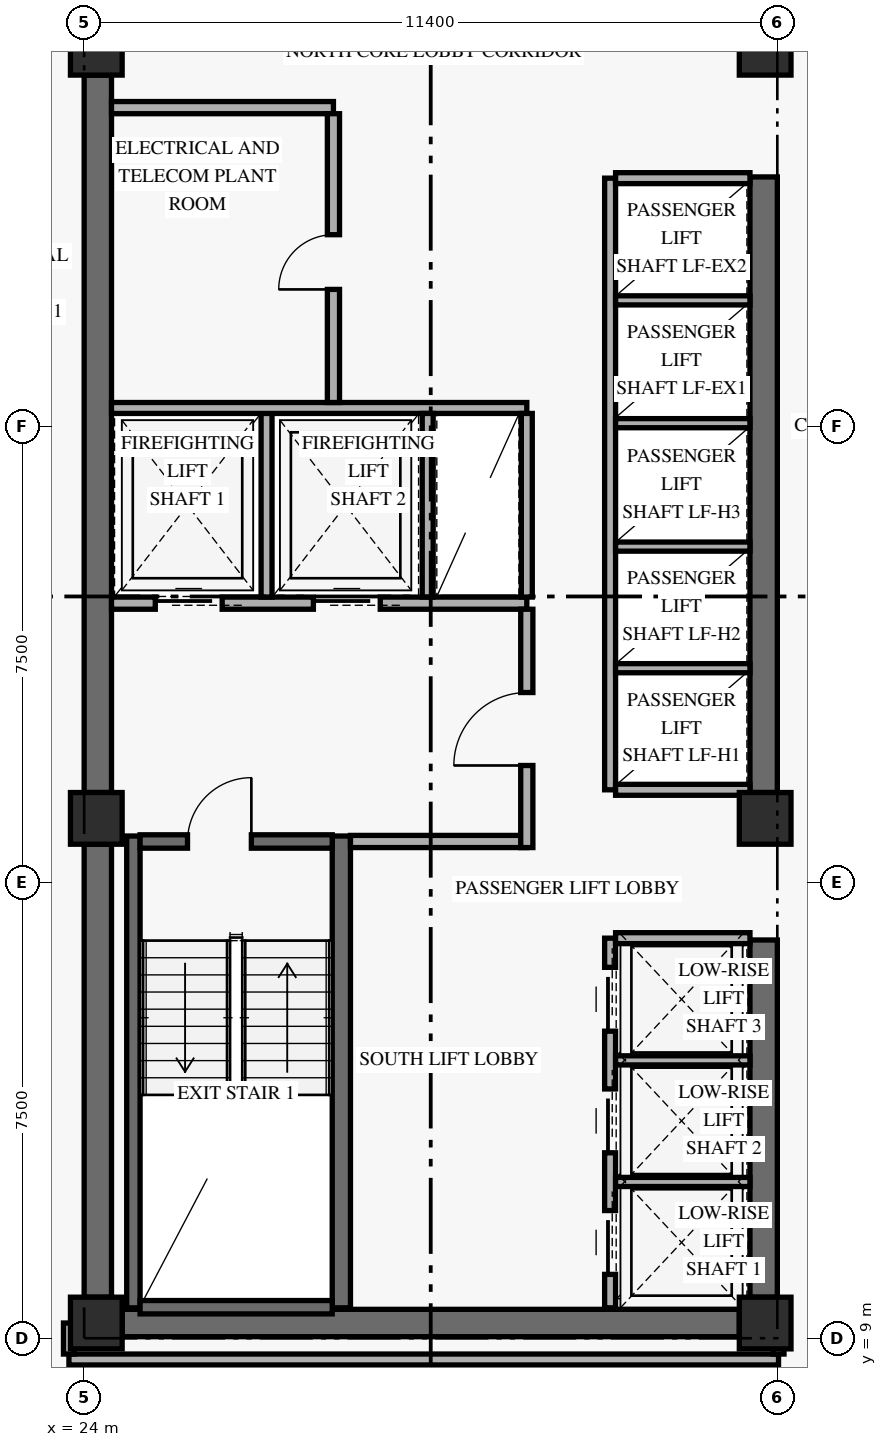
"""IFC4 building model, lengths in metres.
Left out: names, types, materials, properties, quantities, classifications, styles, units other than length and angle.
Written with IfcOpenShell. Run it as: python <this file> out.ifc"""

import sys

from ifc_helpers import new_model, si_unit, direction, frame, frame_2d, origin, origin_2d, place, context, subcontext, project, spatial, rectangle, extrude, element, fill, save


model = new_model("IFC4")
c1 = context("Model", 3, precision=1e-05, world=origin(), true_north=direction((0.0, 1.0)))
c2 = subcontext(c1, "Body", "Model", "MODEL_VIEW")
j1 = project(units=[si_unit("LENGTHUNIT", "METRE"), si_unit("PLANEANGLEUNIT", "RADIAN")], contexts=[c1])
p1 = place(None, origin())
s1 = spatial("IfcSite", under=j1, at=p1, CompositionType="ELEMENT")
p2 = place(p1, origin())
s2 = spatial("IfcBuilding", under=s1, at=p2, CompositionType="ELEMENT")
p3 = place(p2, frame((0.0, 0.0, 94.8)))
s3 = spatial("IfcBuildingStorey", under=s2, at=p3, CompositionType="ELEMENT", Elevation=94.8)
p4 = place(p3, frame((24.225, 9.675, 0.0), z_axis=(0.0, 0.0, 1.0), x_axis=(0.0, 1.0, 0.0)))
e1 = element("IfcWall", 1, at=p4, inside=s3, PredefinedType="SHEAR", context=c2, shape_type="SweptSolid", body=[
    extrude(rectangle(XDim=7.45, YDim=0.45, at=frame_2d((3.725, 0.0))), origin(), (0.0, 0.0, 1.0), 2.739),
])
p5 = place(p3, frame((24.225, 17.975, 0.0), z_axis=(0.0, 0.0, 1.0), x_axis=(0.0, 1.0, 0.0)))
e2 = element("IfcWall", 2, at=p5, inside=s3, PredefinedType="SHEAR", context=c2, shape_type="SweptSolid", body=[
    extrude(rectangle(XDim=11.8, YDim=0.45, at=frame_2d((5.9, 0.0))), origin(), (0.0, 0.0, 1.0), 2.739),
])
p6 = place(p3, frame((35.175, 9.675, 0.0), z_axis=(0.0, 0.0, 1.0), x_axis=(0.0, 1.0, 0.0)))
e3 = element("IfcWall", 3, at=p6, inside=s3, PredefinedType="SHEAR", context=c2, shape_type="SweptSolid", body=[
    extrude(rectangle(XDim=5.875, YDim=0.45, at=frame_2d((2.938, 0.0))), origin(), (0.0, 0.0, 1.0), 2.739),
])
p7 = place(p3, frame((35.175, 17.975, 0.0), z_axis=(0.0, 0.0, 1.0), x_axis=(0.0, 1.0, 0.0)))
e4 = element("IfcWall", 4, at=p7, inside=s3, PredefinedType="SHEAR", context=c2, shape_type="SweptSolid", body=[
    extrude(rectangle(XDim=10.125, YDim=0.45, at=frame_2d((5.062, 0.0))), origin(), (0.0, 0.0, 1.0), 2.739),
])
p8 = place(p3, frame((24.625, 9.25, 0.0), z_axis=(0.0, 0.0, 1.0), x_axis=(1.0, 0.0, 0.0)))
e5 = element("IfcWall", 5, at=p8, inside=s3, PredefinedType="SHEAR", context=c2, shape_type="SweptSolid", body=[
    extrude(rectangle(XDim=10.15, YDim=0.45, at=frame_2d((5.075, 0.0))), origin(), (0.0, 0.0, 1.0), 3.35),
])
p9 = place(p3, frame((24.81, 9.5, 0.0), z_axis=(0.0, 0.0, 1.0), x_axis=(0.0, 1.0, 0.0)))
e6 = element("IfcWall", 6, at=p9, inside=s3, PredefinedType="SHEAR", context=c2, shape_type="SweptSolid", body=[
    extrude(rectangle(XDim=7.76, YDim=0.22, at=frame_2d((3.88, 0.0))), origin(), (0.0, 0.0, 1.0), 3.35),
])
p10 = place(p3, frame((28.23, 9.5, 0.0), z_axis=(0.0, 0.0, 1.0), x_axis=(0.0, 1.0, 0.0)))
e7 = element("IfcWall", 7, at=p10, inside=s3, PredefinedType="SHEAR", context=c2, shape_type="SweptSolid", body=[
    extrude(rectangle(XDim=7.76, YDim=0.3, at=frame_2d((3.88, 0.0))), origin(), (0.0, 0.0, 1.0), 3.35),
])
p11 = place(p3, frame((24.92, 9.51, 0.0), z_axis=(0.0, 0.0, 1.0), x_axis=(1.0, 0.0, 0.0)))
e8 = element("IfcWall", 8, at=p11, inside=s3, PredefinedType="SHEAR", context=c2, shape_type="SweptSolid", body=[
    extrude(rectangle(XDim=3.16, YDim=0.22, at=frame_2d((1.58, 0.0))), origin(), (0.0, 0.0, 1.0), 3.35),
])
p12 = place(p3, frame((24.92, 17.17, 0.0), z_axis=(0.0, 0.0, 1.0), x_axis=(1.0, 0.0, 0.0)))
e9 = element("IfcWall", 9, at=p12, inside=s3, PredefinedType="SHEAR", context=c2, shape_type="SweptSolid", body=[
    extrude(rectangle(XDim=3.16, YDim=0.22, at=frame_2d((1.58, 0.0))), origin(), (0.0, 0.0, 1.0), 3.35),
])
p13 = place(p12, frame((0.78, 0.0, 0.0)))
e10 = element("IfcOpeningElement", 10, at=p13, cuts=e9, PredefinedType="OPENING", context=c2, shape_type="SweptSolid", body=[
    extrude(rectangle(XDim=1.05, YDim=2.15, at=frame_2d((0.525, 1.075))), frame((0.0, 0.12, 0.0), z_axis=(0.0, -1.0, 0.0), x_axis=(1.0, 0.0, 0.0)), (0.0, 0.0, 1.0), 0.24),
])
for number, where, z_axis, x_axis in (
    (11, (24.2, 9.25, 0.0), (0.0, 0.0, 1.0), (1.0, 0.0, 0.0)),
    (12, (24.2, 17.55, 0.0), (0.0, 0.0, 1.0), (1.0, 0.0, 0.0)),
    (13, (24.2, 30.2, 0.0), (0.0, 0.0, 1.0), (1.0, 0.0, 0.0)),
    (14, (35.2, 9.25, 0.0), (0.0, 0.0, 1.0), (1.0, 0.0, 0.0)),
    (15, (35.2, 17.55, 0.0), (0.0, 0.0, 1.0), (1.0, 0.0, 0.0)),
    (16, (35.2, 30.2, 0.0), (0.0, 0.0, 1.0), (1.0, 0.0, 0.0)),
):
    element("IfcColumn", number, at=place(p3, frame(where, z_axis=z_axis, x_axis=x_axis)), inside=s3, PredefinedType="COLUMN", context=c2, shape_type="SweptSolid", body=[
        extrude(rectangle(XDim=0.85, YDim=0.85, at=origin_2d()), origin(), (0.0, 0.0, 1.0), 3.6),
    ])
p14 = place(p3, frame((24.45, 21.09, 0.0), z_axis=(0.0, 0.0, 1.0), x_axis=(1.0, 0.0, 0.0)))
e17 = element("IfcWall", 17, at=p14, inside=s3, PredefinedType="STANDARD", context=c2, shape_type="SweptSolid", body=[
    extrude(rectangle(XDim=6.83, YDim=0.2, at=frame_2d((3.415, 0.0))), origin(), (0.0, 0.0, 1.0), 3.35),
])
p15 = place(p14, frame((0.72, 0.0, 0.0)))
e18 = element("IfcOpeningElement", 18, at=p15, cuts=e17, PredefinedType="OPENING", context=c2, shape_type="SweptSolid", body=[
    extrude(rectangle(XDim=1.1, YDim=2.2, at=frame_2d((0.55, 1.1))), frame((0.0, 0.11, 0.0), z_axis=(0.0, -1.0, 0.0), x_axis=(1.0, 0.0, 0.0)), (0.0, 0.0, 1.0), 0.22),
])
p16 = place(p14, frame((3.32, 0.0, 0.0)))
e19 = element("IfcOpeningElement", 19, at=p16, cuts=e17, PredefinedType="OPENING", context=c2, shape_type="SweptSolid", body=[
    extrude(rectangle(XDim=1.1, YDim=2.2, at=frame_2d((0.55, 1.1))), frame((0.0, 0.11, 0.0), z_axis=(0.0, -1.0, 0.0), x_axis=(1.0, 0.0, 0.0)), (0.0, 0.0, 1.0), 0.22),
])
p17 = place(p3, frame((28.38, 17.17, 0.0), z_axis=(0.0, 0.0, 1.0), x_axis=(1.0, 0.0, 0.0)))
e20 = element("IfcWall", 20, at=p17, inside=s3, PredefinedType="STANDARD", context=c2, shape_type="SweptSolid", body=[
    extrude(rectangle(XDim=2.9, YDim=0.2, at=frame_2d((1.45, 0.0))), origin(), (0.0, 0.0, 1.0), 3.35),
])
p18 = place(p3, frame((31.28, 17.07, 0.0), z_axis=(0.0, 0.0, 1.0), x_axis=(0.0, 1.0, 0.0)))
e21 = element("IfcWall", 21, at=p18, inside=s3, PredefinedType="STANDARD", context=c2, shape_type="SweptSolid", body=[
    extrude(rectangle(XDim=3.92, YDim=0.2, at=frame_2d((1.96, 0.0))), origin(), (0.0, 0.0, 1.0), 2.721),
])
p19 = place(p18, frame((1.35, 0.0, 0.0)))
e22 = element("IfcOpeningElement", 22, at=p19, cuts=e21, PredefinedType="OPENING", context=c2, shape_type="SweptSolid", body=[
    extrude(rectangle(XDim=1.2, YDim=2.15, at=frame_2d((0.6, 1.075))), frame((0.0, 0.11, 0.0), z_axis=(0.0, -1.0, 0.0), x_axis=(1.0, 0.0, 0.0)), (0.0, 0.0, 1.0), 0.22),
])
p20 = place(p3, frame((27.0, 21.19, 0.0), z_axis=(0.0, 0.0, 1.0), x_axis=(0.0, 1.0, 0.0)))
e23 = element("IfcWall", 23, at=p20, inside=s3, PredefinedType="STANDARD", context=c2, shape_type="SweptSolid", body=[
    extrude(rectangle(XDim=3.11, YDim=0.18, at=frame_2d((1.555, 0.0))), origin(), (0.0, 0.0, 1.0), 3.35),
])
p21 = place(p3, frame((24.45, 24.3, 0.0), z_axis=(0.0, 0.0, 1.0), x_axis=(1.0, 0.0, 0.0)))
e24 = element("IfcWall", 24, at=p21, inside=s3, PredefinedType="STANDARD", context=c2, shape_type="SweptSolid", body=[
    extrude(rectangle(XDim=6.83, YDim=0.18, at=frame_2d((3.415, 0.0))), origin(), (0.0, 0.0, 1.0), 3.35),
])
for number, where, z_axis, x_axis in (
    (25, (29.65, 21.19, 0.0), (0.0, 0.0, 1.0), (0.0, 1.0, 0.0)),
    (26, (31.28, 21.19, 0.0), (0.0, 0.0, 1.0), (0.0, 1.0, 0.0)),
):
    element("IfcWall", number, at=place(p3, frame(where, z_axis=z_axis, x_axis=x_axis)), inside=s3, PredefinedType="STANDARD", context=c2, shape_type="SweptSolid", body=[
        extrude(rectangle(XDim=3.02, YDim=0.18, at=frame_2d((1.51, 0.0))), origin(), (0.0, 0.0, 1.0), 3.35),
    ])
p22 = place(p3, frame((24.45, 29.24, 0.0), z_axis=(0.0, 0.0, 1.0), x_axis=(1.0, 0.0, 0.0)))
e27 = element("IfcWall", 27, at=p22, inside=s3, PredefinedType="STANDARD", context=c2, shape_type="SweptSolid", body=[
    extrude(rectangle(XDim=3.65, YDim=0.2, at=frame_2d((1.825, 0.0))), origin(), (0.0, 0.0, 1.0), 3.35),
])
p23 = place(p3, frame((28.1, 24.39, 0.0), z_axis=(0.0, 0.0, 1.0), x_axis=(0.0, 1.0, 0.0)))
e28 = element("IfcWall", 28, at=p23, inside=s3, PredefinedType="STANDARD", context=c2, shape_type="SweptSolid", body=[
    extrude(rectangle(XDim=4.75, YDim=0.2, at=frame_2d((2.375, 0.0))), origin(), (0.0, 0.0, 1.0), 3.35),
])
p24 = place(p23, frame((1.86, 0.0, 0.0)))
e29 = element("IfcOpeningElement", 29, at=p24, cuts=e28, PredefinedType="OPENING", context=c2, shape_type="SweptSolid", body=[
    extrude(rectangle(XDim=0.9, YDim=2.1, at=frame_2d((0.45, 1.05))), frame((0.0, 0.11, 0.0), z_axis=(0.0, -1.0, 0.0), x_axis=(1.0, 0.0, 0.0)), (0.0, 0.0, 1.0), 0.22),
])
p25 = place(p3, frame((32.65, 9.5, 0.0), z_axis=(0.0, 0.0, 1.0), x_axis=(0.0, 1.0, 0.0)))
e30 = element("IfcWall", 30, at=p25, inside=s3, PredefinedType="STANDARD", context=c2, shape_type="SweptSolid", body=[
    extrude(rectangle(XDim=6.08, YDim=0.18, at=frame_2d((3.04, 0.0))), origin(), (0.0, 0.0, 1.0), 3.35),
])
p26 = place(p25, frame((0.55, 0.0, 0.0)))
e31 = element("IfcOpeningElement", 31, at=p26, cuts=e30, PredefinedType="OPENING", context=c2, shape_type="SweptSolid", body=[
    extrude(rectangle(XDim=1.05, YDim=2.2, at=frame_2d((0.525, 1.1))), frame((0.0, 0.1, 0.0), z_axis=(0.0, -1.0, 0.0), x_axis=(1.0, 0.0, 0.0)), (0.0, 0.0, 1.0), 0.2),
])
p27 = place(p25, frame((2.55, 0.0, 0.0)))
e32 = element("IfcOpeningElement", 32, at=p27, cuts=e30, PredefinedType="OPENING", context=c2, shape_type="SweptSolid", body=[
    extrude(rectangle(XDim=1.05, YDim=2.2, at=frame_2d((0.525, 1.1))), frame((0.0, 0.1, 0.0), z_axis=(0.0, -1.0, 0.0), x_axis=(1.0, 0.0, 0.0)), (0.0, 0.0, 1.0), 0.2),
])
p28 = place(p25, frame((4.55, 0.0, 0.0)))
e33 = element("IfcOpeningElement", 33, at=p28, cuts=e30, PredefinedType="OPENING", context=c2, shape_type="SweptSolid", body=[
    extrude(rectangle(XDim=1.05, YDim=2.2, at=frame_2d((0.525, 1.1))), frame((0.0, 0.1, 0.0), z_axis=(0.0, -1.0, 0.0), x_axis=(1.0, 0.0, 0.0)), (0.0, 0.0, 1.0), 0.2),
])
p29 = place(p3, frame((32.74, 15.58, 0.0), z_axis=(0.0, 0.0, 1.0), x_axis=(1.0, 0.0, 0.0)))
e34 = element("IfcWall", 34, at=p29, inside=s3, PredefinedType="STANDARD", context=c2, shape_type="SweptSolid", body=[
    extrude(rectangle(XDim=2.21, YDim=0.18, at=frame_2d((1.105, 0.0))), origin(), (0.0, 0.0, 1.0), 3.35),
])
for number, where, z_axis, x_axis in (
    (35, (32.74, 11.57, 0.0), (0.0, 0.0, 1.0), (1.0, 0.0, 0.0)),
    (36, (32.74, 13.57, 0.0), (0.0, 0.0, 1.0), (1.0, 0.0, 0.0)),
):
    element("IfcWall", number, at=place(p3, frame(where, z_axis=z_axis, x_axis=x_axis)), inside=s3, PredefinedType="STANDARD", context=c2, shape_type="SweptSolid", body=[
        extrude(rectangle(XDim=2.21, YDim=0.15, at=frame_2d((1.105, 0.0))), origin(), (0.0, 0.0, 1.0), 3.35),
    ])
p30 = place(p3, frame((32.65, 18.02, 0.0), z_axis=(0.0, 0.0, 1.0), x_axis=(0.0, 1.0, 0.0)))
e37 = element("IfcWall", 37, at=p30, inside=s3, PredefinedType="STANDARD", context=c2, shape_type="SweptSolid", body=[
    extrude(rectangle(XDim=10.06, YDim=0.18, at=frame_2d((5.03, 0.0))), origin(), (0.0, 0.0, 1.0), 3.35),
])
for number, where, z_axis, x_axis in (
    (38, (32.74, 18.02, 0.0), (0.0, 0.0, 1.0), (1.0, 0.0, 0.0)),
    (39, (32.74, 28.08, 0.0), (0.0, 0.0, 1.0), (1.0, 0.0, 0.0)),
):
    element("IfcWall", number, at=place(p3, frame(where, z_axis=z_axis, x_axis=x_axis)), inside=s3, PredefinedType="STANDARD", context=c2, shape_type="SweptSolid", body=[
        extrude(rectangle(XDim=2.21, YDim=0.18, at=frame_2d((1.105, 0.0))), origin(), (0.0, 0.0, 1.0), 3.35),
    ])
for number, where, z_axis, x_axis in (
    (40, (32.74, 20.02, 0.0), (0.0, 0.0, 1.0), (1.0, 0.0, 0.0)),
    (41, (32.74, 22.02, 0.0), (0.0, 0.0, 1.0), (1.0, 0.0, 0.0)),
    (42, (32.74, 24.05, 0.0), (0.0, 0.0, 1.0), (1.0, 0.0, 0.0)),
    (43, (32.74, 26.07, 0.0), (0.0, 0.0, 1.0), (1.0, 0.0, 0.0)),
):
    element("IfcWall", number, at=place(p3, frame(where, z_axis=z_axis, x_axis=x_axis)), inside=s3, PredefinedType="STANDARD", context=c2, shape_type="SweptSolid", body=[
        extrude(rectangle(XDim=2.21, YDim=0.15, at=frame_2d((1.105, 0.0))), origin(), (0.0, 0.0, 1.0), 3.35),
    ])
p31 = place(p3, frame((23.75, 8.65, 0.0), z_axis=(0.0, 0.0, 1.0), x_axis=(1.0, 0.0, 0.0)))
e44 = element("IfcWall", 44, at=p31, inside=s3, PredefinedType="STANDARD", context=c2, shape_type="SweptSolid", body=[
    extrude(rectangle(XDim=11.67, YDim=0.18, at=frame_2d((5.835, 0.0))), origin(), (0.0, 0.0, 1.0), 2.721),
])
for number, where, z_axis, x_axis in (
    (45, (35.42, 8.74, 0.0), (0.0, 0.0, 1.0), (0.0, 1.0, 0.0)),
    (46, (23.75, 8.74, 0.0), (0.0, 0.0, 1.0), (0.0, 1.0, 0.0)),
):
    element("IfcWall", number, at=place(p3, frame(where, z_axis=z_axis, x_axis=x_axis)), inside=s3, PredefinedType="STANDARD", context=c2, shape_type="SweptSolid", body=[
        extrude(rectangle(XDim=0.51, YDim=0.18, at=frame_2d((0.255, 0.0))), origin(), (0.0, 0.0, 1.0), 2.721),
    ])
p32 = place(p13, frame((1.05, 0.0, 0.0), z_axis=(0.0, 0.0, 1.0), x_axis=(-1.0, 0.0, 0.0)))
e47 = element("IfcDoor", 47, at=p32, inside=s3, OperationType="SINGLE_SWING_LEFT", PredefinedType="DOOR", context=c2, shape_type="SweptSolid", body=[
    extrude(rectangle(XDim=1.05, YDim=2.15, at=frame_2d((0.525, 1.075))), frame((0.0, 0.025, 0.0), z_axis=(0.0, -1.0, 0.0), x_axis=(1.0, 0.0, 0.0)), (0.0, 0.0, 1.0), 0.05),
])
fill(e10, e47)
p33 = place(p15, origin())
e48 = element("IfcDoor", 48, at=p33, inside=s3, OperationType="SLIDING_TO_LEFT", PredefinedType="DOOR", context=c2, shape_type="SweptSolid", body=[
    extrude(rectangle(XDim=1.1, YDim=2.2, at=frame_2d((0.55, 1.1))), frame((0.0, 0.025, 0.0), z_axis=(0.0, -1.0, 0.0), x_axis=(1.0, 0.0, 0.0)), (0.0, 0.0, 1.0), 0.05),
])
fill(e18, e48)
p34 = place(p16, origin())
e49 = element("IfcDoor", 49, at=p34, inside=s3, OperationType="SLIDING_TO_LEFT", PredefinedType="DOOR", context=c2, shape_type="SweptSolid", body=[
    extrude(rectangle(XDim=1.1, YDim=2.2, at=frame_2d((0.55, 1.1))), frame((0.0, 0.025, 0.0), z_axis=(0.0, -1.0, 0.0), x_axis=(1.0, 0.0, 0.0)), (0.0, 0.0, 1.0), 0.05),
])
fill(e19, e49)
p35 = place(p19, origin())
e50 = element("IfcDoor", 50, at=p35, inside=s3, OperationType="SINGLE_SWING_LEFT", PredefinedType="DOOR", context=c2, shape_type="SweptSolid", body=[
    extrude(rectangle(XDim=1.2, YDim=2.15, at=frame_2d((0.6, 1.075))), frame((0.0, 0.025, 0.0), z_axis=(0.0, -1.0, 0.0), x_axis=(1.0, 0.0, 0.0)), (0.0, 0.0, 1.0), 0.05),
])
fill(e22, e50)
p36 = place(p24, origin())
e51 = element("IfcDoor", 51, at=p36, inside=s3, OperationType="SINGLE_SWING_LEFT", PredefinedType="DOOR", context=c2, shape_type="SweptSolid", body=[
    extrude(rectangle(XDim=0.9, YDim=2.1, at=frame_2d((0.45, 1.05))), frame((0.0, 0.025, 0.0), z_axis=(0.0, -1.0, 0.0), x_axis=(1.0, 0.0, 0.0)), (0.0, 0.0, 1.0), 0.05),
])
fill(e29, e51)
p37 = place(p26, origin())
e52 = element("IfcDoor", 52, at=p37, inside=s3, OperationType="SLIDING_TO_LEFT", PredefinedType="DOOR", context=c2, shape_type="SweptSolid", body=[
    extrude(rectangle(XDim=1.05, YDim=2.2, at=frame_2d((0.525, 1.1))), frame((0.0, 0.025, 0.0), z_axis=(0.0, -1.0, 0.0), x_axis=(1.0, 0.0, 0.0)), (0.0, 0.0, 1.0), 0.05),
])
fill(e31, e52)
p38 = place(p27, origin())
e53 = element("IfcDoor", 53, at=p38, inside=s3, OperationType="SLIDING_TO_LEFT", PredefinedType="DOOR", context=c2, shape_type="SweptSolid", body=[
    extrude(rectangle(XDim=1.05, YDim=2.2, at=frame_2d((0.525, 1.1))), frame((0.0, 0.025, 0.0), z_axis=(0.0, -1.0, 0.0), x_axis=(1.0, 0.0, 0.0)), (0.0, 0.0, 1.0), 0.05),
])
fill(e32, e53)
p39 = place(p28, origin())
e54 = element("IfcDoor", 54, at=p39, inside=s3, OperationType="SLIDING_TO_LEFT", PredefinedType="DOOR", context=c2, shape_type="SweptSolid", body=[
    extrude(rectangle(XDim=1.05, YDim=2.2, at=frame_2d((0.525, 1.1))), frame((0.0, 0.025, 0.0), z_axis=(0.0, -1.0, 0.0), x_axis=(1.0, 0.0, 0.0)), (0.0, 0.0, 1.0), 0.05),
])
fill(e33, e54)
save(model, sys.argv[1])
